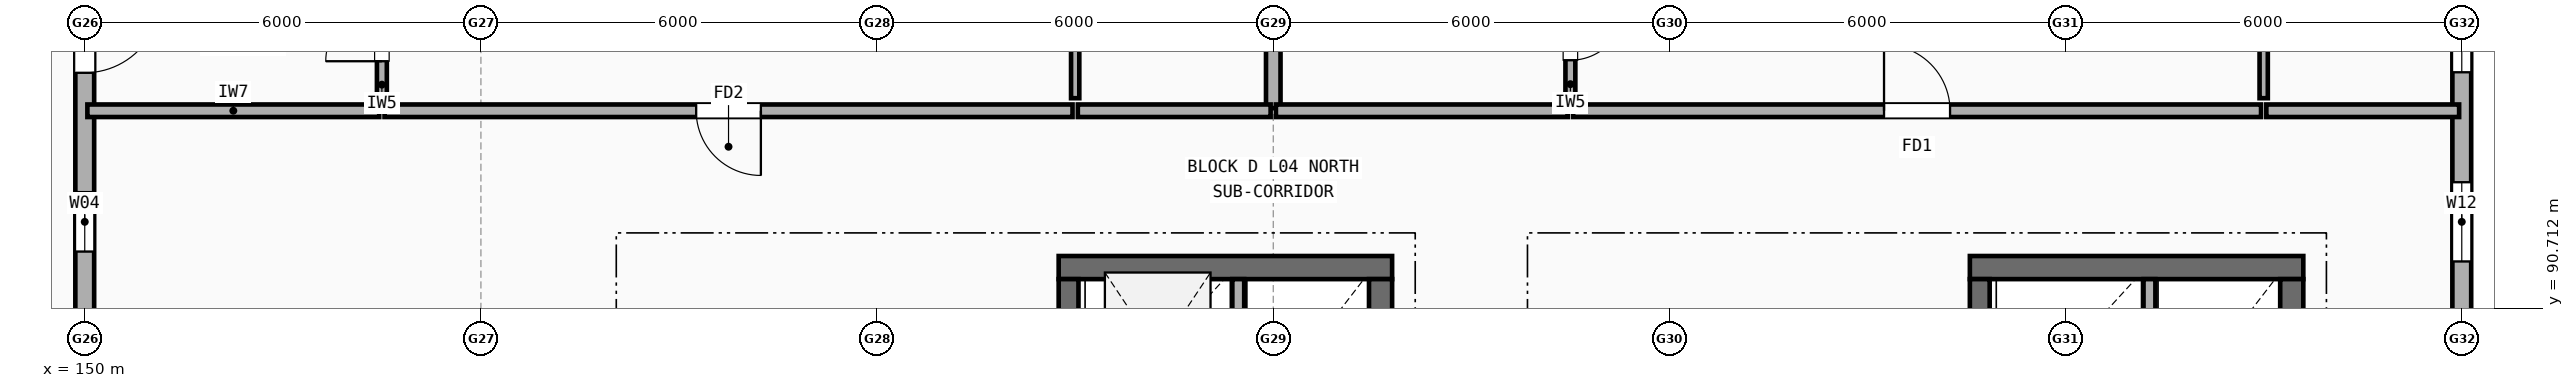
"""IFC4 building model, lengths in metres.
Left out: names, types, materials, properties, quantities, classifications, styles, units other than length and angle.
Written with IfcOpenShell. Run it as: python <this file> out.ifc"""

import sys

from ifc_helpers import new_model, si_unit, direction, frame, frame_2d, origin, place, context, subcontext, project, spatial, rectangle, extrude, element, fill, save


model = new_model("IFC4")
c1 = context("Model", 3, precision=1e-05, world=origin(), true_north=direction((0.0, 1.0)))
c2 = subcontext(c1, "Body", "Model", "MODEL_VIEW")
j1 = project(units=[si_unit("LENGTHUNIT", "METRE"), si_unit("PLANEANGLEUNIT", "RADIAN")], contexts=[c1])
p1 = place(None, origin())
s1 = spatial("IfcSite", under=j1, at=p1, CompositionType="ELEMENT")
p2 = place(p1, origin())
s2 = spatial("IfcBuilding", under=s1, at=p2, CompositionType="ELEMENT")
p3 = place(p2, frame((0.0, 0.0, 14.1)))
s3 = spatial("IfcBuildingStorey", under=s2, at=p3, CompositionType="ELEMENT", Elevation=14.1)
p4 = place(p3, frame((186.0, 90.375, 0.0), z_axis=(0.0, 0.0, 1.0), x_axis=(0.0, 1.0, 0.0)))
e1 = element("IfcWall", 1, at=p4, inside=s3, PredefinedType="STANDARD", context=c2, shape_type="SweptSolid", body=[
    extrude(rectangle(XDim=5.25, YDim=0.285, at=frame_2d((2.625, 0.0))), origin(), (0.0, 0.0, 1.0), 2.432),
])
p5 = place(p4, frame((1.042, 0.0, 0.9)))
e2 = element("IfcOpeningElement", 2, at=p5, cuts=e1, PredefinedType="OPENING", context=c2, shape_type="SweptSolid", body=[
    extrude(rectangle(XDim=1.2, YDim=1.35, at=frame_2d((0.6, 0.675))), frame((0.0, 0.152, 0.0), z_axis=(0.0, -1.0, 0.0), x_axis=(1.0, 0.0, 0.0)), (0.0, 0.0, 1.0), 0.305),
])
p6 = place(p4, frame((3.907, 0.0, 0.9)))
e3 = element("IfcOpeningElement", 3, at=p6, cuts=e1, PredefinedType="OPENING", context=c2, shape_type="SweptSolid", body=[
    extrude(rectangle(XDim=0.8, YDim=1.2, at=frame_2d((0.4, 0.6))), frame((0.0, 0.152, 0.0), z_axis=(0.0, -1.0, 0.0), x_axis=(1.0, 0.0, 0.0)), (0.0, 0.0, 1.0), 0.305),
])
p7 = place(p3, frame((150.0, 95.625, 0.0), z_axis=(0.0, 0.0, 1.0), x_axis=(0.0, -1.0, 0.0)))
e4 = element("IfcWall", 4, at=p7, inside=s3, PredefinedType="STANDARD", context=c2, shape_type="SweptSolid", body=[
    extrude(rectangle(XDim=5.25, YDim=0.285, at=frame_2d((2.625, 0.0))), origin(), (0.0, 0.0, 1.0), 2.432),
])
p8 = place(p7, frame((0.2, 0.0, 0.0)))
e5 = element("IfcOpeningElement", 5, at=p8, cuts=e4, PredefinedType="OPENING", context=c2, shape_type="SweptSolid", body=[
    extrude(rectangle(XDim=1.15, YDim=2.15, at=frame_2d((0.575, 1.075))), frame((0.0, 0.152, 0.0), z_axis=(0.0, -1.0, 0.0), x_axis=(1.0, 0.0, 0.0)), (0.0, 0.0, 1.0), 0.305),
])
p9 = place(p7, frame((3.157, 0.0, 0.9)))
e6 = element("IfcOpeningElement", 6, at=p9, cuts=e4, PredefinedType="OPENING", context=c2, shape_type="SweptSolid", body=[
    extrude(rectangle(XDim=0.9, YDim=1.3, at=frame_2d((0.45, 0.65))), frame((0.0, 0.152, 0.0), z_axis=(0.0, -1.0, 0.0), x_axis=(1.0, 0.0, 0.0)), (0.0, 0.0, 1.0), 0.305),
])
p10 = place(p3, frame((169.8, 91.325, 0.0), z_axis=(0.0, 0.0, 1.0), x_axis=(-1.0, 0.0, 0.0)))
e7 = element("IfcWall", 7, at=p10, inside=s3, PredefinedType="SHEAR", context=c2, shape_type="SweptSolid", body=[
    extrude(rectangle(XDim=5.05, YDim=0.35, at=frame_2d((2.525, 0.0))), origin(), (0.0, 0.0, 1.0), 2.95),
])
p11 = place(p3, frame((169.625, 84.75, 0.0), z_axis=(0.0, 0.0, 1.0), x_axis=(0.0, 1.0, 0.0)))
e8 = element("IfcWall", 8, at=p11, inside=s3, PredefinedType="SHEAR", context=c2, shape_type="SweptSolid", body=[
    extrude(rectangle(XDim=6.4, YDim=0.35, at=frame_2d((3.2, 0.0))), origin(), (0.0, 0.0, 1.0), 2.95),
])
p12 = place(p3, frame((164.9, 87.8, 0.0), z_axis=(0.0, 0.0, 1.0), x_axis=(0.0, 1.0, 0.0)))
e9 = element("IfcWall", 9, at=p12, inside=s3, PredefinedType="SHEAR", context=c2, shape_type="SweptSolid", body=[
    extrude(rectangle(XDim=3.35, YDim=0.3, at=frame_2d((1.675, 0.0))), origin(), (0.0, 0.0, 1.0), 2.95),
])
p13 = place(p3, frame((167.47, 88.94, 0.0), z_axis=(0.0, 0.0, 1.0), x_axis=(0.0, 1.0, 0.0)))
e10 = element("IfcWall", 10, at=p13, inside=s3, PredefinedType="SOLIDWALL", context=c2, shape_type="SweptSolid", body=[
    extrude(rectangle(XDim=2.21, YDim=0.18, at=frame_2d((1.105, 0.0))), origin(), (0.0, 0.0, 1.0), 2.95),
])
p14 = place(p3, frame((183.6, 91.325, 0.0), z_axis=(0.0, 0.0, 1.0), x_axis=(-1.0, 0.0, 0.0)))
e11 = element("IfcWall", 11, at=p14, inside=s3, PredefinedType="SHEAR", context=c2, shape_type="SweptSolid", body=[
    extrude(rectangle(XDim=5.05, YDim=0.35, at=frame_2d((2.525, 0.0))), origin(), (0.0, 0.0, 1.0), 2.95),
])
p15 = place(p3, frame((183.425, 84.75, 0.0), z_axis=(0.0, 0.0, 1.0), x_axis=(0.0, 1.0, 0.0)))
e12 = element("IfcWall", 12, at=p15, inside=s3, PredefinedType="SHEAR", context=c2, shape_type="SweptSolid", body=[
    extrude(rectangle(XDim=6.4, YDim=0.35, at=frame_2d((3.2, 0.0))), origin(), (0.0, 0.0, 1.0), 2.95),
])
p16 = place(p3, frame((178.7, 87.7, 0.0), z_axis=(0.0, 0.0, 1.0), x_axis=(0.0, 1.0, 0.0)))
e13 = element("IfcWall", 13, at=p16, inside=s3, PredefinedType="SHEAR", context=c2, shape_type="SweptSolid", body=[
    extrude(rectangle(XDim=3.45, YDim=0.3, at=frame_2d((1.725, 0.0))), origin(), (0.0, 0.0, 1.0), 2.95),
])
p17 = place(p3, frame((181.27, 88.94, 0.0), z_axis=(0.0, 0.0, 1.0), x_axis=(0.0, 1.0, 0.0)))
e14 = element("IfcWall", 14, at=p17, inside=s3, PredefinedType="SOLIDWALL", context=c2, shape_type="SweptSolid", body=[
    extrude(rectangle(XDim=2.21, YDim=0.18, at=frame_2d((1.105, 0.0))), origin(), (0.0, 0.0, 1.0), 2.95),
])
p18 = place(p3, frame((168.0, 93.74, 0.0), z_axis=(0.0, 0.0, 1.0), x_axis=(0.0, 1.0, 0.0)))
e15 = element("IfcWall", 15, at=p18, inside=s3, PredefinedType="SOLIDWALL", context=c2, shape_type="SweptSolid", body=[
    extrude(rectangle(XDim=13.87, YDim=0.22, at=frame_2d((6.935, 0.0))), origin(), (0.0, 0.0, 1.0), 2.458),
])
p19 = place(p3, frame((150.04, 93.7, 0.0), z_axis=(0.0, 0.0, 1.0), x_axis=(1.0, 0.0, 0.0)))
e16 = element("IfcWall", 16, at=p19, inside=s3, PredefinedType="SOLIDWALL", context=c2, shape_type="SweptSolid", body=[
    extrude(rectangle(XDim=4.42, YDim=0.19, at=frame_2d((2.21, 0.0))), origin(), (0.0, 0.0, 1.0), 2.432),
])
p20 = place(p3, frame((154.54, 93.7, 0.0), z_axis=(0.0, 0.0, 1.0), x_axis=(1.0, 0.0, 0.0)))
e17 = element("IfcWall", 17, at=p20, inside=s3, PredefinedType="SOLIDWALL", context=c2, shape_type="SweptSolid", body=[
    extrude(rectangle(XDim=10.42, YDim=0.19, at=frame_2d((5.21, 0.0))), origin(), (0.0, 0.0, 1.0), 2.432),
])
p21 = place(p20, frame((4.72, 0.0, 0.0)))
e18 = element("IfcOpeningElement", 18, at=p21, cuts=e17, PredefinedType="OPENING", context=c2, shape_type="SweptSolid", body=[
    extrude(rectangle(XDim=0.98, YDim=2.15, at=frame_2d((0.49, 1.075))), frame((0.0, 0.105, 0.0), z_axis=(0.0, -1.0, 0.0), x_axis=(1.0, 0.0, 0.0)), (0.0, 0.0, 1.0), 0.21),
])
p22 = place(p3, frame((154.5, 93.89, 0.0), z_axis=(0.0, 0.0, 1.0), x_axis=(0.0, 1.0, 0.0)))
e19 = element("IfcWall", 19, at=p22, inside=s3, PredefinedType="PARTITIONING", context=c2, shape_type="SweptSolid", body=[
    extrude(rectangle(XDim=1.97, YDim=0.15, at=frame_2d((0.985, 0.0))), origin(), (0.0, 0.0, 1.0), 2.95),
])
p23 = place(p22, frame((0.56, 0.0, 0.0)))
e20 = element("IfcOpeningElement", 20, at=p23, cuts=e19, PredefinedType="OPENING", context=c2, shape_type="SweptSolid", body=[
    extrude(rectangle(XDim=0.85, YDim=2.1, at=frame_2d((0.425, 1.05))), frame((0.0, 0.085, 0.0), z_axis=(0.0, -1.0, 0.0), x_axis=(1.0, 0.0, 0.0)), (0.0, 0.0, 1.0), 0.17),
])
p24 = place(p3, frame((165.04, 93.7, 0.0), z_axis=(0.0, 0.0, 1.0), x_axis=(1.0, 0.0, 0.0)))
e21 = element("IfcWall", 21, at=p24, inside=s3, PredefinedType="SOLIDWALL", context=c2, shape_type="SweptSolid", body=[
    extrude(rectangle(XDim=2.92, YDim=0.19, at=frame_2d((1.46, 0.0))), origin(), (0.0, 0.0, 1.0), 2.508),
])
p25 = place(p3, frame((165.0, 93.89, 0.0), z_axis=(0.0, 0.0, 1.0), x_axis=(0.0, 1.0, 0.0)))
e22 = element("IfcWall", 22, at=p25, inside=s3, PredefinedType="PARTITIONING", context=c2, shape_type="SweptSolid", body=[
    extrude(rectangle(XDim=13.92, YDim=0.125, at=frame_2d((6.96, 0.0))), origin(), (0.0, 0.0, 1.0), 2.408),
])
p26 = place(p25, frame((6.65, 0.0, 0.0)))
e23 = element("IfcOpeningElement", 23, at=p26, cuts=e22, PredefinedType="OPENING", context=c2, shape_type="SweptSolid", body=[
    extrude(rectangle(XDim=0.9, YDim=2.1, at=frame_2d((0.45, 1.05))), frame((0.0, 0.073, 0.0), z_axis=(0.0, -1.0, 0.0), x_axis=(1.0, 0.0, 0.0)), (0.0, 0.0, 1.0), 0.145),
])
p27 = place(p3, frame((168.04, 93.7, 0.0), z_axis=(0.0, 0.0, 1.0), x_axis=(1.0, 0.0, 0.0)))
e24 = element("IfcWall", 24, at=p27, inside=s3, PredefinedType="SOLIDWALL", context=c2, shape_type="SweptSolid", body=[
    extrude(rectangle(XDim=4.42, YDim=0.19, at=frame_2d((2.21, 0.0))), origin(), (0.0, 0.0, 1.0), 2.508),
])
p28 = place(p3, frame((172.54, 93.7, 0.0), z_axis=(0.0, 0.0, 1.0), x_axis=(1.0, 0.0, 0.0)))
e25 = element("IfcWall", 25, at=p28, inside=s3, PredefinedType="SOLIDWALL", context=c2, shape_type="SweptSolid", body=[
    extrude(rectangle(XDim=10.42, YDim=0.19, at=frame_2d((5.21, 0.0))), origin(), (0.0, 0.0, 1.0), 2.95),
])
p29 = place(p28, frame((4.71, 0.0, 0.0)))
e26 = element("IfcOpeningElement", 26, at=p29, cuts=e25, PredefinedType="OPENING", context=c2, shape_type="SweptSolid", body=[
    extrude(rectangle(XDim=1.0, YDim=2.15, at=frame_2d((0.5, 1.075))), frame((0.0, 0.105, 0.0), z_axis=(0.0, -1.0, 0.0), x_axis=(1.0, 0.0, 0.0)), (0.0, 0.0, 1.0), 0.21),
])
p30 = place(p3, frame((172.5, 93.89, 0.0), z_axis=(0.0, 0.0, 1.0), x_axis=(0.0, 1.0, 0.0)))
e27 = element("IfcWall", 27, at=p30, inside=s3, PredefinedType="PARTITIONING", context=c2, shape_type="SweptSolid", body=[
    extrude(rectangle(XDim=1.97, YDim=0.15, at=frame_2d((0.985, 0.0))), origin(), (0.0, 0.0, 1.0), 2.95),
])
p31 = place(p30, frame((0.575, 0.0, 0.0)))
e28 = element("IfcOpeningElement", 28, at=p31, cuts=e27, PredefinedType="OPENING", context=c2, shape_type="SweptSolid", body=[
    extrude(rectangle(XDim=0.82, YDim=2.08, at=frame_2d((0.41, 1.04))), frame((0.0, 0.085, 0.0), z_axis=(0.0, -1.0, 0.0), x_axis=(1.0, 0.0, 0.0)), (0.0, 0.0, 1.0), 0.17),
])
p32 = place(p3, frame((183.04, 93.7, 0.0), z_axis=(0.0, 0.0, 1.0), x_axis=(1.0, 0.0, 0.0)))
e29 = element("IfcWall", 29, at=p32, inside=s3, PredefinedType="SOLIDWALL", context=c2, shape_type="SweptSolid", body=[
    extrude(rectangle(XDim=2.92, YDim=0.19, at=frame_2d((1.46, 0.0))), origin(), (0.0, 0.0, 1.0), 2.432),
])
p33 = place(p3, frame((183.0, 93.89, 0.0), z_axis=(0.0, 0.0, 1.0), x_axis=(0.0, 1.0, 0.0)))
e30 = element("IfcWall", 30, at=p33, inside=s3, PredefinedType="PARTITIONING", context=c2, shape_type="SweptSolid", body=[
    extrude(rectangle(XDim=13.92, YDim=0.125, at=frame_2d((6.96, 0.0))), origin(), (0.0, 0.0, 1.0), 2.408),
])
p34 = place(p33, frame((6.65, 0.0, 0.0)))
e31 = element("IfcOpeningElement", 31, at=p34, cuts=e30, PredefinedType="OPENING", context=c2, shape_type="SweptSolid", body=[
    extrude(rectangle(XDim=0.88, YDim=2.1, at=frame_2d((0.44, 1.05))), frame((0.0, 0.073, 0.0), z_axis=(0.0, -1.0, 0.0), x_axis=(1.0, 0.0, 0.0)), (0.0, 0.0, 1.0), 0.145),
])
p35 = place(p5, origin())
e32 = element("IfcWindow", 32, at=p35, inside=s3, PartitioningType="SINGLE_PANEL", PredefinedType="WINDOW", context=c2, shape_type="SweptSolid", body=[
    extrude(rectangle(XDim=1.2, YDim=1.35, at=frame_2d((0.6, 0.675))), frame((0.0, 0.03, 0.0), z_axis=(0.0, -1.0, 0.0), x_axis=(1.0, 0.0, 0.0)), (0.0, 0.0, 1.0), 0.06),
])
fill(e2, e32)
p36 = place(p6, origin())
e33 = element("IfcWindow", 33, at=p36, inside=s3, PartitioningType="SINGLE_PANEL", PredefinedType="WINDOW", context=c2, shape_type="SweptSolid", body=[
    extrude(rectangle(XDim=0.8, YDim=1.2, at=frame_2d((0.4, 0.6))), frame((0.0, 0.03, 0.0), z_axis=(0.0, -1.0, 0.0), x_axis=(1.0, 0.0, 0.0)), (0.0, 0.0, 1.0), 0.06),
])
fill(e3, e33)
p37 = place(p8, frame((1.15, 0.0, 0.0), z_axis=(0.0, 0.0, 1.0), x_axis=(-1.0, 0.0, 0.0)))
e34 = element("IfcDoor", 34, at=p37, inside=s3, OperationType="SINGLE_SWING_LEFT", PredefinedType="DOOR", context=c2, shape_type="SweptSolid", body=[
    extrude(rectangle(XDim=1.15, YDim=2.15, at=frame_2d((0.575, 1.075))), frame((0.0, 0.025, 0.0), z_axis=(0.0, -1.0, 0.0), x_axis=(1.0, 0.0, 0.0)), (0.0, 0.0, 1.0), 0.05),
])
fill(e5, e34)
p38 = place(p9, origin())
e35 = element("IfcWindow", 35, at=p38, inside=s3, PartitioningType="SINGLE_PANEL", PredefinedType="WINDOW", context=c2, shape_type="SweptSolid", body=[
    extrude(rectangle(XDim=0.9, YDim=1.3, at=frame_2d((0.45, 0.65))), frame((0.0, 0.03, 0.0), z_axis=(0.0, -1.0, 0.0), x_axis=(1.0, 0.0, 0.0)), (0.0, 0.0, 1.0), 0.06),
])
fill(e6, e35)
p39 = place(p21, origin())
e36 = element("IfcDoor", 36, at=p39, inside=s3, OperationType="SINGLE_SWING_RIGHT", PredefinedType="DOOR", context=c2, shape_type="SweptSolid", body=[
    extrude(rectangle(XDim=0.98, YDim=2.15, at=frame_2d((0.49, 1.075))), frame((0.0, 0.025, 0.0), z_axis=(0.0, -1.0, 0.0), x_axis=(1.0, 0.0, 0.0)), (0.0, 0.0, 1.0), 0.05),
])
fill(e18, e36)
p40 = place(p23, origin())
e37 = element("IfcDoor", 37, at=p40, inside=s3, OperationType="SINGLE_SWING_LEFT", PredefinedType="DOOR", context=c2, shape_type="SweptSolid", body=[
    extrude(rectangle(XDim=0.85, YDim=2.1, at=frame_2d((0.425, 1.05))), frame((0.0, 0.025, 0.0), z_axis=(0.0, -1.0, 0.0), x_axis=(1.0, 0.0, 0.0)), (0.0, 0.0, 1.0), 0.05),
])
fill(e20, e37)
p41 = place(p29, origin())
e38 = element("IfcDoor", 38, at=p41, inside=s3, OperationType="SINGLE_SWING_LEFT", PredefinedType="DOOR", context=c2, shape_type="SweptSolid", body=[
    extrude(rectangle(XDim=1.0, YDim=2.15, at=frame_2d((0.5, 1.075))), frame((0.0, 0.025, 0.0), z_axis=(0.0, -1.0, 0.0), x_axis=(1.0, 0.0, 0.0)), (0.0, 0.0, 1.0), 0.05),
])
fill(e26, e38)
p42 = place(p31, origin())
e39 = element("IfcDoor", 39, at=p42, inside=s3, OperationType="SINGLE_SWING_RIGHT", PredefinedType="DOOR", context=c2, shape_type="SweptSolid", body=[
    extrude(rectangle(XDim=0.82, YDim=2.08, at=frame_2d((0.41, 1.04))), frame((0.0, 0.025, 0.0), z_axis=(0.0, -1.0, 0.0), x_axis=(1.0, 0.0, 0.0)), (0.0, 0.0, 1.0), 0.05),
])
fill(e28, e39)
save(model, sys.argv[1])
